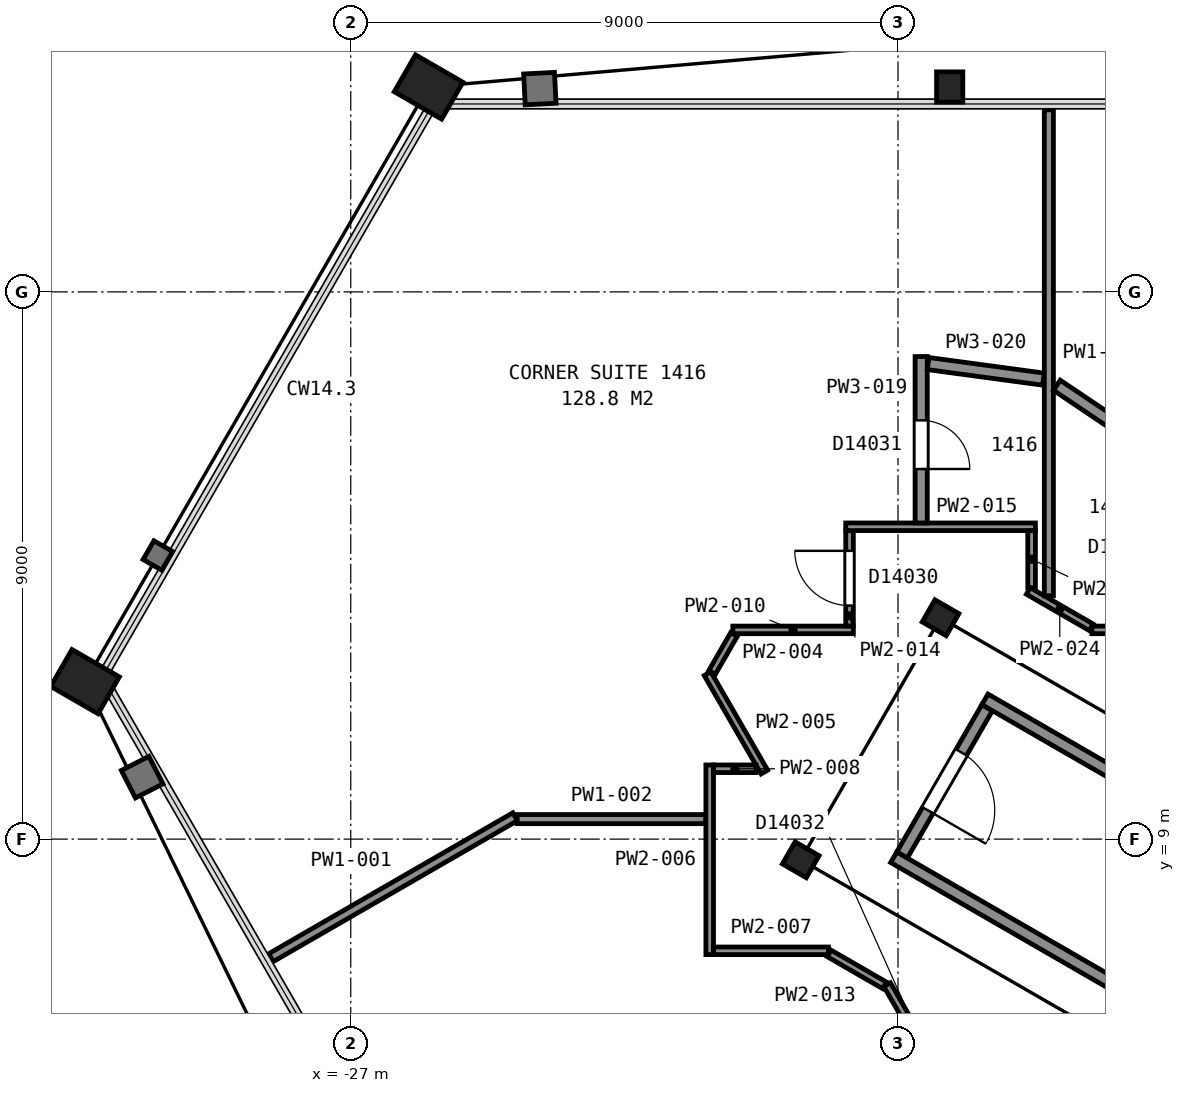
"""IFC4 building model, lengths in metres.
Left out: names, types, materials, properties, quantities, classifications, styles, units other than length and angle.
Written with IfcOpenShell. Run it as: python <this file> out.ifc"""

import sys

from ifc_helpers import new_model, si_unit, direction, frame, frame_2d, origin, origin_2d, place, context, subcontext, project, spatial, rectangle, hollow_rectangle, i_section, extrude, element, fill, save


model = new_model("IFC4")
c1 = context("Model", 3, precision=1e-05, world=origin(), true_north=direction((0.0, 1.0)))
c2 = subcontext(c1, "Body", "Model", "MODEL_VIEW")
j1 = project(units=[si_unit("LENGTHUNIT", "METRE"), si_unit("PLANEANGLEUNIT", "RADIAN")], contexts=[c1])
p1 = place(None, origin())
s1 = spatial("IfcSite", under=j1, at=p1, CompositionType="ELEMENT")
p2 = place(p1, origin())
s2 = spatial("IfcBuilding", under=s1, at=p2, CompositionType="ELEMENT")
p3 = place(p2, frame((0.0, 0.0, 65.6)))
s3 = spatial("IfcBuildingStorey", under=s2, at=p3, CompositionType="ELEMENT", Elevation=65.6)
p4 = place(p3, frame((-17.15, 21.37, 0.025), z_axis=(0.0, 0.0, 1.0), x_axis=(1.0, 0.0, 0.0)))
e1 = element("IfcColumn", 1, at=p4, inside=s3, PredefinedType="COLUMN", context=c2, shape_type="SweptSolid", body=[
    extrude(i_section(OverallWidth=0.432, OverallDepth=0.498, WebThickness=0.056, FlangeThickness=0.089, FilletRadius=0.015, at=origin_2d()), origin(), (0.0, 0.0, 1.0), 3.575),
])
for number, where, z_axis, x_axis in (
    (2, (-25.72, 21.37, 0.04), (0.0, 0.0, 1.0), (0.5, 0.866, 0.0)),
    (3, (-31.37, 11.59, 0.04), (0.0, 0.0, 1.0), (0.5, 0.866, 0.0)),
):
    element("IfcColumn", number, at=place(p3, frame(where, z_axis=z_axis, x_axis=x_axis)), inside=s3, PredefinedType="COLUMN", context=c2, shape_type="SweptSolid", body=[
        extrude(hollow_rectangle(XDim=0.7, YDim=0.9, WallThickness=0.065, at=origin_2d()), origin(), (0.0, 0.0, 1.0), 3.56),
    ])
for number, where, z_axis, x_axis in (
    (4, (-17.3, 12.64, 0.0), (0.0, 0.0, 1.0), (0.5, 0.866, 0.0)),
    (5, (-19.6, 8.66, 0.0), (0.0, 0.0, 1.0), (0.5, 0.866, 0.0)),
):
    element("IfcColumn", number, at=place(p3, frame(where, z_axis=z_axis, x_axis=x_axis)), inside=s3, PredefinedType="COLUMN", context=c2, shape_type="SweptSolid", body=[
        extrude(i_section(OverallWidth=0.419, OverallDepth=0.455, WebThickness=0.042, FlangeThickness=0.068, FilletRadius=0.015, at=origin_2d()), origin(), (0.0, 0.0, 1.0), 3.6),
    ])
p5 = place(p3, frame((-16.534, 11.162, 0.0), z_axis=(0.0, 0.0, 1.0), x_axis=(-0.49998411664, -0.866034573852, 0.0)))
e6 = element("IfcWall", 6, at=p5, inside=s3, PredefinedType="PARTITIONING", context=c2, shape_type="SweptSolid", body=[
    extrude(rectangle(XDim=2.8, YDim=0.2, at=frame_2d((1.4, 0.0))), origin(), (0.0, 0.0, 1.0), 3.35),
])
p6 = place(p5, frame((0.85, 0.0, 0.0)))
e7 = element("IfcOpeningElement", 7, at=p6, cuts=e6, PredefinedType="OPENING", context=c2, shape_type="SweptSolid", body=[
    extrude(rectangle(XDim=1.1, YDim=2.1, at=frame_2d((0.55, 1.05))), frame((0.0, 0.11, 0.0), z_axis=(0.0, -1.0, 0.0), x_axis=(1.0, 0.0, 0.0)), (0.0, 0.0, 1.0), 0.22),
])
for number, where, z_axis, x_axis in (
    (8, (-7.678, 2.701, 0.0), (0.0, 0.0, 1.0), (-0.866, 0.5, 0.0)),
    (9, (-6.178, 5.299, 0.0), (0.0, 0.0, 1.0), (-0.866, 0.5, 0.0)),
):
    element("IfcWall", number, at=place(p3, frame(where, z_axis=z_axis, x_axis=x_axis)), inside=s3, PredefinedType="PARTITIONING", context=c2, shape_type="SweptSolid", body=[
        extrude(rectangle(XDim=12.0, YDim=0.2, at=frame_2d((6.0, 0.0))), origin(), (0.0, 0.0, 1.0), 3.35),
    ])
p7 = place(p3, frame((-28.313, 7.05, 0.0), z_axis=(0.0, 0.0, 1.0), x_axis=(0.866076865069, 0.499910855846, 0.0)))
e10 = element("IfcWall", 10, at=p7, inside=s3, PredefinedType="PARTITIONING", context=c2, shape_type="SweptSolid", body=[
    extrude(rectangle(XDim=4.636, YDim=0.15, at=frame_2d((2.318, 0.0))), origin(), (0.0, 0.0, 1.0), 2.613),
])
p8 = place(p3, frame((-24.262, 9.329, 0.0), z_axis=(0.0, 0.0, 1.0), x_axis=(1.0, 0.0, 0.0)))
e11 = element("IfcWall", 11, at=p8, inside=s3, PredefinedType="PARTITIONING", context=c2, shape_type="SweptSolid", body=[
    extrude(rectangle(XDim=3.103, YDim=0.15, at=frame_2d((1.551, 0.0))), origin(), (0.0, 0.0, 1.0), 2.613),
])
p9 = place(p3, frame((-21.059, 11.741, 0.0), z_axis=(0.0, 0.0, 1.0), x_axis=(0.500238258503, 0.865887801468, 0.0)))
e12 = element("IfcWall", 12, at=p9, inside=s3, PredefinedType="PARTITIONING", context=c2, shape_type="SweptSolid", body=[
    extrude(rectangle(XDim=0.724, YDim=0.125, at=frame_2d((0.362, 0.0))), origin(), (0.0, 0.0, 1.0), 2.613),
])
p10 = place(p3, frame((-21.132, 11.721, 0.0), z_axis=(0.0, 0.0, 1.0), x_axis=(0.500072997275, -0.865983254686, 0.0)))
e13 = element("IfcWall", 13, at=p10, inside=s3, PredefinedType="PARTITIONING", context=c2, shape_type="SweptSolid", body=[
    extrude(rectangle(XDim=1.869, YDim=0.125, at=frame_2d((0.935, 0.0))), origin(), (0.0, 0.0, 1.0), 2.613),
])
p11 = place(p3, frame((-21.097, 7.101, 0.0), z_axis=(0.0, 0.0, 1.0), x_axis=(0.0, 1.0, 0.0)))
e14 = element("IfcWall", 14, at=p11, inside=s3, PredefinedType="PARTITIONING", context=c2, shape_type="SweptSolid", body=[
    extrude(rectangle(XDim=3.119, YDim=0.125, at=frame_2d((1.56, 0.0))), origin(), (0.0, 0.0, 1.0), 2.613),
])
p12 = place(p3, frame((-21.032, 7.163, 0.0), z_axis=(0.0, 0.0, 1.0), x_axis=(1.0, 0.0, 0.0)))
e15 = element("IfcWall", 15, at=p12, inside=s3, PredefinedType="PARTITIONING", context=c2, shape_type="SweptSolid", body=[
    extrude(rectangle(XDim=1.888, YDim=0.125, at=frame_2d((0.944, 0.0))), origin(), (0.0, 0.0, 1.0), 2.613),
])
p13 = place(p3, frame((-21.032, 10.157, 0.0), z_axis=(0.0, 0.0, 1.0), x_axis=(1.0, 0.0, 0.0)))
e16 = element("IfcWall", 16, at=p13, inside=s3, PredefinedType="PARTITIONING", context=c2, shape_type="SweptSolid", body=[
    extrude(rectangle(XDim=0.698, YDim=0.125, at=frame_2d((0.349, 0.0))), origin(), (0.0, 0.0, 1.0), 2.613),
])
p14 = place(p3, frame((-20.717, 12.441, 0.0), z_axis=(0.0, 0.0, 1.0), x_axis=(1.0, 0.0, 0.0)))
e17 = element("IfcWall", 17, at=p14, inside=s3, PredefinedType="PARTITIONING", context=c2, shape_type="SweptSolid", body=[
    extrude(rectangle(XDim=1.982, YDim=0.125, at=frame_2d((0.991, 0.0))), origin(), (0.0, 0.0, 1.0), 2.613),
])
p15 = place(p3, frame((-19.132, 7.121, 0.0), z_axis=(0.0, 0.0, 1.0), x_axis=(0.865876245925, -0.500258260045, 0.0)))
e18 = element("IfcWall", 18, at=p15, inside=s3, PredefinedType="PARTITIONING", context=c2, shape_type="SweptSolid", body=[
    extrude(rectangle(XDim=1.052, YDim=0.125, at=frame_2d((0.526, 0.0))), origin(), (0.0, 0.0, 1.0), 2.613),
])
p16 = place(p3, frame((-18.797, 12.506, 0.0), z_axis=(0.0, 0.0, 1.0), x_axis=(0.0, 1.0, 0.0)))
e19 = element("IfcWall", 19, at=p16, inside=s3, PredefinedType="PARTITIONING", context=c2, shape_type="SweptSolid", body=[
    extrude(rectangle(XDim=1.566, YDim=0.125, at=frame_2d((0.783, 0.0))), origin(), (0.0, 0.0, 1.0), 2.613),
])
p17 = place(p16, frame((0.335, 0.0, 0.0)))
e20 = element("IfcOpeningElement", 20, at=p17, cuts=e19, PredefinedType="OPENING", context=c2, shape_type="SweptSolid", body=[
    extrude(rectangle(XDim=0.9, YDim=2.1, at=frame_2d((0.45, 1.05))), frame((0.0, 0.073, 0.0), z_axis=(0.0, -1.0, 0.0), x_axis=(1.0, 0.0, 0.0)), (0.0, 0.0, 1.0), 0.145),
])
p18 = place(p3, frame((-18.86, 14.137, 0.0), z_axis=(0.0, 0.0, 1.0), x_axis=(1.0, 0.0, 0.0)))
e21 = element("IfcWall", 21, at=p18, inside=s3, PredefinedType="PARTITIONING", context=c2, shape_type="SweptSolid", body=[
    extrude(rectangle(XDim=3.119, YDim=0.125, at=frame_2d((1.56, 0.0))), origin(), (0.0, 0.0, 1.0), 2.613),
])
p19 = place(p3, frame((-3.766, -18.358, 0.0), z_axis=(0.0, 0.0, 1.0), x_axis=(-0.500003973642, 0.866023109589, 0.0)))
e22 = element("IfcWall", 22, at=p19, inside=s3, PredefinedType="PARTITIONING", context=c2, shape_type="SweptSolid", body=[
    extrude(rectangle(XDim=28.826, YDim=0.125, at=frame_2d((14.413, 0.0))), origin(), (0.0, 0.0, 1.0), 2.613),
])
p20 = place(p19, frame((27.114, 0.0, 0.0)))
e23 = element("IfcOpeningElement", 23, at=p20, cuts=e22, PredefinedType="OPENING", context=c2, shape_type="SweptSolid", body=[
    extrude(rectangle(XDim=0.9, YDim=2.1, at=frame_2d((0.45, 1.05))), frame((0.0, 0.073, 0.0), z_axis=(0.0, -1.0, 0.0), x_axis=(1.0, 0.0, 0.0)), (0.0, 0.0, 1.0), 0.145),
])
p21 = place(p19, frame((20.322, 0.0, 0.0)))
e24 = element("IfcOpeningElement", 24, at=p21, cuts=e22, PredefinedType="OPENING", context=c2, shape_type="SweptSolid", body=[
    extrude(rectangle(XDim=0.9, YDim=2.1, at=frame_2d((0.45, 1.05))), frame((0.0, 0.073, 0.0), z_axis=(0.0, -1.0, 0.0), x_axis=(1.0, 0.0, 0.0)), (0.0, 0.0, 1.0), 0.145),
])
p22 = place(p19, frame((17.68, 0.0, 0.0)))
e25 = element("IfcOpeningElement", 25, at=p22, cuts=e22, PredefinedType="OPENING", context=c2, shape_type="SweptSolid", body=[
    extrude(rectangle(XDim=0.9, YDim=2.1, at=frame_2d((0.45, 1.05))), frame((0.0, 0.073, 0.0), z_axis=(0.0, -1.0, 0.0), x_axis=(1.0, 0.0, 0.0)), (0.0, 0.0, 1.0), 0.145),
])
p23 = place(p19, frame((10.836, 0.0, 0.0)))
e26 = element("IfcOpeningElement", 26, at=p23, cuts=e22, PredefinedType="OPENING", context=c2, shape_type="SweptSolid", body=[
    extrude(rectangle(XDim=0.9, YDim=2.1, at=frame_2d((0.45, 1.05))), frame((0.0, 0.073, 0.0), z_axis=(0.0, -1.0, 0.0), x_axis=(1.0, 0.0, 0.0)), (0.0, 0.0, 1.0), 0.145),
])
p24 = place(p19, frame((7.342, 0.0, 0.0)))
e27 = element("IfcOpeningElement", 27, at=p24, cuts=e22, PredefinedType="OPENING", context=c2, shape_type="SweptSolid", body=[
    extrude(rectangle(XDim=0.9, YDim=2.1, at=frame_2d((0.45, 1.05))), frame((0.0, 0.073, 0.0), z_axis=(0.0, -1.0, 0.0), x_axis=(1.0, 0.0, 0.0)), (0.0, 0.0, 1.0), 0.145),
])
p25 = place(p3, frame((-17.619, 16.937, 0.0), z_axis=(0.0, 0.0, 1.0), x_axis=(0.0, -1.0, 0.0)))
e28 = element("IfcWall", 28, at=p25, inside=s3, PredefinedType="PARTITIONING", context=c2, shape_type="SweptSolid", body=[
    extrude(rectangle(XDim=2.738, YDim=0.2, at=frame_2d((1.369, 0.0))), origin(), (0.0, 0.0, 1.0), 2.613),
])
p26 = place(p25, frame((1.05, 0.0, 0.0)))
e29 = element("IfcOpeningElement", 29, at=p26, cuts=e28, PredefinedType="OPENING", context=c2, shape_type="SweptSolid", body=[
    extrude(rectangle(XDim=0.8, YDim=2.1, at=frame_2d((0.4, 1.05))), frame((0.0, 0.11, 0.0), z_axis=(0.0, -1.0, 0.0), x_axis=(1.0, 0.0, 0.0)), (0.0, 0.0, 1.0), 0.22),
])
p27 = place(p3, frame((-17.505, 16.822, 0.0), z_axis=(0.0, 0.0, 1.0), x_axis=(0.990982367401, -0.133992341199, 0.0)))
e30 = element("IfcWall", 30, at=p27, inside=s3, PredefinedType="PARTITIONING", context=c2, shape_type="SweptSolid", body=[
    extrude(rectangle(XDim=1.915, YDim=0.2, at=frame_2d((0.958, 0.0))), origin(), (0.0, 0.0, 1.0), 2.613),
])
p28 = place(p3, frame((-15.803, 13.135, 0.0), z_axis=(0.0, 0.0, 1.0), x_axis=(0.0, 1.0, 0.0)))
e31 = element("IfcWall", 31, at=p28, inside=s3, PredefinedType="PARTITIONING", context=c2, shape_type="SweptSolid", body=[
    extrude(rectangle(XDim=0.937, YDim=0.125, at=frame_2d((0.469, 0.0))), origin(), (0.0, 0.0, 1.0), 2.613),
])
p29 = place(p3, frame((-15.857, 13.081, 0.0), z_axis=(0.0, 0.0, 1.0), x_axis=(0.866035997947, -0.499981649923, 0.0)))
e32 = element("IfcWall", 32, at=p29, inside=s3, PredefinedType="PARTITIONING", context=c2, shape_type="SweptSolid", body=[
    extrude(rectangle(XDim=1.196, YDim=0.125, at=frame_2d((0.598, 0.0))), origin(), (0.0, 0.0, 1.0), 2.613),
])
p30 = place(p3, frame((-15.519, 13.001, 0.0), z_axis=(0.0, 0.0, 1.0), x_axis=(0.0, 1.0, 0.0)))
e33 = element("IfcWall", 33, at=p30, inside=s3, PredefinedType="PARTITIONING", context=c2, shape_type="SweptSolid", body=[
    extrude(rectangle(XDim=7.994, YDim=0.15, at=frame_2d((3.997, 0.0))), origin(), (0.0, 0.0, 1.0), 2.613),
])
p31 = place(p3, frame((-15.388, 16.465, 0.0), z_axis=(0.0, 0.0, 1.0), x_axis=(0.82987399284, -0.557950854474, 0.0)))
e34 = element("IfcWall", 34, at=p31, inside=s3, PredefinedType="PARTITIONING", context=c2, shape_type="SweptSolid", body=[
    extrude(rectangle(XDim=2.233, YDim=0.2, at=frame_2d((1.116, 0.0))), origin(), (0.0, 0.0, 1.0), 2.613),
])
p32 = place(p3, frame((-14.811, 12.441, 0.0), z_axis=(0.0, 0.0, 1.0), x_axis=(1.0, 0.0, 0.0)))
e35 = element("IfcWall", 35, at=p32, inside=s3, PredefinedType="PARTITIONING", context=c2, shape_type="SweptSolid", body=[
    extrude(rectangle(XDim=29.621, YDim=0.125, at=frame_2d((14.811, 0.0))), origin(), (0.0, 0.0, 1.0), 2.613),
])
p33 = place(p32, frame((25.326, 0.0, 0.0)))
e36 = element("IfcOpeningElement", 36, at=p33, cuts=e35, PredefinedType="OPENING", context=c2, shape_type="SweptSolid", body=[
    extrude(rectangle(XDim=0.9, YDim=2.1, at=frame_2d((0.45, 1.05))), frame((0.0, 0.073, 0.0), z_axis=(0.0, -1.0, 0.0), x_axis=(1.0, 0.0, 0.0)), (0.0, 0.0, 1.0), 0.145),
])
p34 = place(p32, frame((21.833, 0.0, 0.0)))
e37 = element("IfcOpeningElement", 37, at=p34, cuts=e35, PredefinedType="OPENING", context=c2, shape_type="SweptSolid", body=[
    extrude(rectangle(XDim=0.9, YDim=2.1, at=frame_2d((0.45, 1.05))), frame((0.0, 0.073, 0.0), z_axis=(0.0, -1.0, 0.0), x_axis=(1.0, 0.0, 0.0)), (0.0, 0.0, 1.0), 0.145),
])
p35 = place(p32, frame((14.99, 0.0, 0.0)))
e38 = element("IfcOpeningElement", 38, at=p35, cuts=e35, PredefinedType="OPENING", context=c2, shape_type="SweptSolid", body=[
    extrude(rectangle(XDim=0.9, YDim=2.1, at=frame_2d((0.45, 1.05))), frame((0.0, 0.073, 0.0), z_axis=(0.0, -1.0, 0.0), x_axis=(1.0, 0.0, 0.0)), (0.0, 0.0, 1.0), 0.145),
])
p36 = place(p32, frame((12.128, 0.0, 0.0)))
e39 = element("IfcOpeningElement", 39, at=p36, cuts=e35, PredefinedType="OPENING", context=c2, shape_type="SweptSolid", body=[
    extrude(rectangle(XDim=0.9, YDim=2.1, at=frame_2d((0.45, 1.05))), frame((0.0, 0.073, 0.0), z_axis=(0.0, -1.0, 0.0), x_axis=(1.0, 0.0, 0.0)), (0.0, 0.0, 1.0), 0.145),
])
p37 = place(p32, frame((4.885, 0.0, 0.0)))
e40 = element("IfcOpeningElement", 40, at=p37, cuts=e35, PredefinedType="OPENING", context=c2, shape_type="SweptSolid", body=[
    extrude(rectangle(XDim=0.9, YDim=2.1, at=frame_2d((0.45, 1.05))), frame((0.0, 0.073, 0.0), z_axis=(0.0, -1.0, 0.0), x_axis=(1.0, 0.0, 0.0)), (0.0, 0.0, 1.0), 0.145),
])
p38 = place(p32, frame((2.241, 0.0, 0.0)))
e41 = element("IfcOpeningElement", 41, at=p38, cuts=e35, PredefinedType="OPENING", context=c2, shape_type="SweptSolid", body=[
    extrude(rectangle(XDim=0.9, YDim=2.1, at=frame_2d((0.45, 1.05))), frame((0.0, 0.073, 0.0), z_axis=(0.0, -1.0, 0.0), x_axis=(1.0, 0.0, 0.0)), (0.0, 0.0, 1.0), 0.145),
])
p39 = place(p6, origin())
e42 = element("IfcDoor", 42, at=p39, inside=s3, OperationType="SINGLE_SWING_RIGHT", PredefinedType="DOOR", context=c2, shape_type="SweptSolid", body=[
    extrude(rectangle(XDim=1.1, YDim=2.1, at=frame_2d((0.55, 1.05))), frame((0.0, 0.025, 0.0), z_axis=(0.0, -1.0, 0.0), x_axis=(1.0, 0.0, 0.0)), (0.0, 0.0, 1.0), 0.05),
])
fill(e7, e42)
p40 = place(p17, origin())
e43 = element("IfcDoor", 43, at=p40, inside=s3, OperationType="SINGLE_SWING_RIGHT", PredefinedType="DOOR", context=c2, shape_type="SweptSolid", body=[
    extrude(rectangle(XDim=0.9, YDim=2.1, at=frame_2d((0.45, 1.05))), frame((0.0, 0.025, 0.0), z_axis=(0.0, -1.0, 0.0), x_axis=(1.0, 0.0, 0.0)), (0.0, 0.0, 1.0), 0.05),
])
fill(e20, e43)
p41 = place(p26, origin())
e44 = element("IfcDoor", 44, at=p41, inside=s3, OperationType="SINGLE_SWING_RIGHT", PredefinedType="DOOR", context=c2, shape_type="SweptSolid", body=[
    extrude(rectangle(XDim=0.8, YDim=2.1, at=frame_2d((0.4, 1.05))), frame((0.0, 0.025, 0.0), z_axis=(0.0, -1.0, 0.0), x_axis=(1.0, 0.0, 0.0)), (0.0, 0.0, 1.0), 0.05),
])
fill(e29, e44)
save(model, sys.argv[1])
